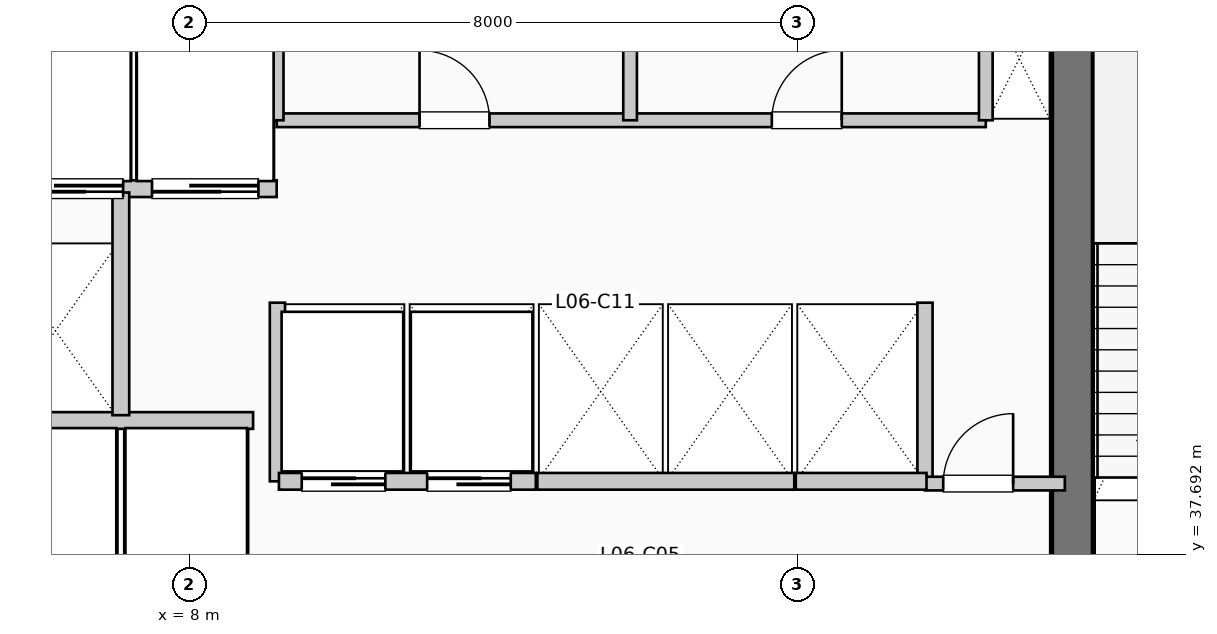
"""IFC4 building model, lengths in metres.
Left out: names, types, materials, properties, quantities, classifications, styles, units other than length and angle.
Written with IfcOpenShell. Run it as: python <this file> out.ifc"""

import sys

from ifc_helpers import new_model, si_unit, direction, frame, frame_2d, origin, place, context, subcontext, project, spatial, rectangle, extrude, element, fill, save


model = new_model("IFC4")
c1 = context("Model", 3, precision=1e-05, world=origin(), true_north=direction((0.0, 1.0)))
c2 = subcontext(c1, "Body", "Model", "MODEL_VIEW")
j1 = project(units=[si_unit("LENGTHUNIT", "METRE"), si_unit("PLANEANGLEUNIT", "RADIAN")], contexts=[c1])
p1 = place(None, origin())
s1 = spatial("IfcSite", under=j1, at=p1, CompositionType="ELEMENT")
p2 = place(p1, origin())
s2 = spatial("IfcBuilding", under=s1, at=p2, CompositionType="ELEMENT")
p3 = place(p2, frame((0.0, 0.0, 30.36)))
s3 = spatial("IfcBuildingStorey", under=s2, at=p3, CompositionType="ELEMENT", Elevation=30.36)
p4 = place(p3, frame((19.62, 37.15, 0.0), z_axis=(0.0, 0.0, 1.0), x_axis=(0.0, 1.0, 0.0)))
e1 = element("IfcWall", 1, at=p4, inside=s3, PredefinedType="SHEAR", context=c2, shape_type="SweptSolid", body=[
    extrude(rectangle(XDim=7.89, YDim=0.55, at=frame_2d((3.945, 0.0))), origin(), (0.0, 0.0, 1.0), 3.96),
])
p5 = place(p3, frame((5.38, 39.45, 0.0), z_axis=(0.0, 0.0, 1.0), x_axis=(1.0, 0.0, 0.0)))
e2 = element("IfcWall", 2, at=p5, inside=s3, PredefinedType="PARTITIONING", context=c2, shape_type="SweptSolid", body=[
    extrude(rectangle(XDim=3.46, YDim=0.22, at=frame_2d((1.73, 0.0))), origin(), (0.0, 0.0, 1.0), 3.71),
])
p6 = place(p3, frame((5.38, 42.5, 0.0), z_axis=(0.0, 0.0, 1.0), x_axis=(1.0, 0.0, 0.0)))
e3 = element("IfcWall", 3, at=p6, inside=s3, PredefinedType="PARTITIONING", context=c2, shape_type="SweptSolid", body=[
    extrude(rectangle(XDim=3.77, YDim=0.22, at=frame_2d((1.885, 0.0))), origin(), (0.0, 0.0, 1.0), 3.71),
])
p7 = place(p6, frame((1.75, 0.0, 0.0), z_axis=(0.0, 0.0, 1.0), x_axis=(-1.0, 0.0, 0.0)))
e4 = element("IfcOpeningElement", 4, at=p7, cuts=e3, PredefinedType="OPENING", context=c2, shape_type="SweptSolid", body=[
    extrude(rectangle(XDim=1.4, YDim=2.2, at=frame_2d((0.7, 1.1))), frame((0.0, 0.12, 0.0), z_axis=(0.0, -1.0, 0.0), x_axis=(1.0, 0.0, 0.0)), (0.0, 0.0, 1.0), 0.24),
])
p8 = place(p6, frame((3.53, 0.0, 0.0), z_axis=(0.0, 0.0, 1.0), x_axis=(-1.0, 0.0, 0.0)))
e5 = element("IfcOpeningElement", 5, at=p8, cuts=e3, PredefinedType="OPENING", context=c2, shape_type="SweptSolid", body=[
    extrude(rectangle(XDim=1.4, YDim=2.2, at=frame_2d((0.7, 1.1))), frame((0.0, 0.12, 0.0), z_axis=(0.0, -1.0, 0.0), x_axis=(1.0, 0.0, 0.0)), (0.0, 0.0, 1.0), 0.24),
])
p9 = place(p3, frame((7.1, 39.52, 0.0), z_axis=(0.0, 0.0, 1.0), x_axis=(0.0, 1.0, 0.0)))
e6 = element("IfcWall", 6, at=p9, inside=s3, PredefinedType="PARTITIONING", context=c2, shape_type="SweptSolid", body=[
    extrude(rectangle(XDim=2.93, YDim=0.22, at=frame_2d((1.465, 0.0))), origin(), (0.0, 0.0, 1.0), 3.71),
])
for number, where, z_axis, x_axis in (
    (7, (9.16, 38.65, 0.0), (0.0, 0.0, 1.0), (0.0, 1.0, 0.0)),
    (8, (17.68, 38.65, 0.0), (0.0, 0.0, 1.0), (0.0, 1.0, 0.0)),
):
    element("IfcWall", number, at=place(p3, frame(where, z_axis=z_axis, x_axis=x_axis)), inside=s3, PredefinedType="PARTITIONING", context=c2, shape_type="SweptSolid", body=[
        extrude(rectangle(XDim=2.35, YDim=0.2, at=frame_2d((1.175, 0.0))), origin(), (0.0, 0.0, 1.0), 3.71),
    ])
p10 = place(p3, frame((17.68, 38.62, 0.0), z_axis=(0.0, 0.0, 1.0), x_axis=(1.0, 0.0, 0.0)))
e9 = element("IfcWall", 9, at=p10, inside=s3, PredefinedType="PARTITIONING", context=c2, shape_type="SweptSolid", body=[
    extrude(rectangle(XDim=1.84, YDim=0.18, at=frame_2d((0.92, 0.0))), origin(), (0.0, 0.0, 1.0), 3.71),
])
p11 = place(p10, frame((0.24, 0.0, 0.0)))
e10 = element("IfcOpeningElement", 10, at=p11, cuts=e9, PredefinedType="OPENING", context=c2, shape_type="SweptSolid", body=[
    extrude(rectangle(XDim=0.92, YDim=2.1, at=frame_2d((0.46, 1.05))), frame((0.0, 0.1, 0.0), z_axis=(0.0, -1.0, 0.0), x_axis=(1.0, 0.0, 0.0)), (0.0, 0.0, 1.0), 0.2),
])
p12 = place(p3, frame((9.18, 38.65, 0.0), z_axis=(0.0, 0.0, 1.0), x_axis=(1.0, 0.0, 0.0)))
e11 = element("IfcWall", 11, at=p12, inside=s3, PredefinedType="PARTITIONING", context=c2, shape_type="SweptSolid", body=[
    extrude(rectangle(XDim=3.38, YDim=0.22, at=frame_2d((1.69, 0.0))), origin(), (0.0, 0.0, 1.0), 3.71),
])
p13 = place(p12, frame((0.3, 0.0, 0.0)))
e12 = element("IfcOpeningElement", 12, at=p13, cuts=e11, PredefinedType="OPENING", context=c2, shape_type="SweptSolid", body=[
    extrude(rectangle(XDim=1.1, YDim=2.2, at=frame_2d((0.55, 1.1))), frame((0.0, 0.12, 0.0), z_axis=(0.0, -1.0, 0.0), x_axis=(1.0, 0.0, 0.0)), (0.0, 0.0, 1.0), 0.24),
])
p14 = place(p12, frame((1.95, 0.0, 0.0)))
e13 = element("IfcOpeningElement", 13, at=p14, cuts=e11, PredefinedType="OPENING", context=c2, shape_type="SweptSolid", body=[
    extrude(rectangle(XDim=1.1, YDim=2.2, at=frame_2d((0.55, 1.1))), frame((0.0, 0.12, 0.0), z_axis=(0.0, -1.0, 0.0), x_axis=(1.0, 0.0, 0.0)), (0.0, 0.0, 1.0), 0.24),
])
p15 = place(p3, frame((12.58, 38.65, 0.0), z_axis=(0.0, 0.0, 1.0), x_axis=(1.0, 0.0, 0.0)))
e14 = element("IfcWall", 14, at=p15, inside=s3, PredefinedType="PARTITIONING", context=c2, shape_type="SweptSolid", body=[
    extrude(rectangle(XDim=3.38, YDim=0.22, at=frame_2d((1.69, 0.0))), origin(), (0.0, 0.0, 1.0), 3.71),
])
p16 = place(p3, frame((15.98, 38.65, 0.0), z_axis=(0.0, 0.0, 1.0), x_axis=(1.0, 0.0, 0.0)))
e15 = element("IfcWall", 15, at=p16, inside=s3, PredefinedType="PARTITIONING", context=c2, shape_type="SweptSolid", body=[
    extrude(rectangle(XDim=1.72, YDim=0.22, at=frame_2d((0.86, 0.0))), origin(), (0.0, 0.0, 1.0), 3.71),
])
p17 = place(p3, frame((9.15, 43.4, 0.0), z_axis=(0.0, 0.0, 1.0), x_axis=(1.0, 0.0, 0.0)))
e16 = element("IfcWall", 16, at=p17, inside=s3, PredefinedType="PLUMBINGWALL", context=c2, shape_type="SweptSolid", body=[
    extrude(rectangle(XDim=9.33, YDim=0.18, at=frame_2d((4.665, 0.0))), origin(), (0.0, 0.0, 1.0), 3.71),
])
p18 = place(p17, frame((1.88, 0.0, 0.0)))
e17 = element("IfcOpeningElement", 17, at=p18, cuts=e16, PredefinedType="OPENING", context=c2, shape_type="SweptSolid", body=[
    extrude(rectangle(XDim=0.92, YDim=2.1, at=frame_2d((0.46, 1.05))), frame((0.0, 0.1, 0.0), z_axis=(0.0, -1.0, 0.0), x_axis=(1.0, 0.0, 0.0)), (0.0, 0.0, 1.0), 0.2),
])
p19 = place(p17, frame((6.515, 0.0, 0.0)))
e18 = element("IfcOpeningElement", 18, at=p19, cuts=e16, PredefinedType="OPENING", context=c2, shape_type="SweptSolid", body=[
    extrude(rectangle(XDim=0.92, YDim=2.1, at=frame_2d((0.46, 1.05))), frame((0.0, 0.1, 0.0), z_axis=(0.0, -1.0, 0.0), x_axis=(1.0, 0.0, 0.0)), (0.0, 0.0, 1.0), 0.2),
])
for number, where, z_axis, x_axis in (
    (19, (9.15, 43.4, 0.0), (0.0, 0.0, 1.0), (0.0, 1.0, 0.0)),
    (20, (18.48, 43.4, 0.0), (0.0, 0.0, 1.0), (0.0, 1.0, 0.0)),
    (21, (13.8, 43.4, 0.0), (0.0, 0.0, 1.0), (0.0, 1.0, 0.0)),
):
    element("IfcWall", number, at=place(p3, frame(where, z_axis=z_axis, x_axis=x_axis)), inside=s3, PredefinedType="PLUMBINGWALL", context=c2, shape_type="SweptSolid", body=[
        extrude(rectangle(XDim=1.88, YDim=0.18, at=frame_2d((0.94, 0.0))), origin(), (0.0, 0.0, 1.0), 3.71),
    ])
p20 = place(p7, origin())
e22 = element("IfcDoor", 22, at=p20, inside=s3, OperationType="SLIDING_TO_LEFT", PredefinedType="DOOR", context=c2, shape_type="SweptSolid", body=[
    extrude(rectangle(XDim=1.4, YDim=2.2, at=frame_2d((0.7, 1.1))), frame((0.0, 0.025, 0.0), z_axis=(0.0, -1.0, 0.0), x_axis=(1.0, 0.0, 0.0)), (0.0, 0.0, 1.0), 0.05),
])
fill(e4, e22)
p21 = place(p8, origin())
e23 = element("IfcDoor", 23, at=p21, inside=s3, OperationType="SLIDING_TO_LEFT", PredefinedType="DOOR", context=c2, shape_type="SweptSolid", body=[
    extrude(rectangle(XDim=1.4, YDim=2.2, at=frame_2d((0.7, 1.1))), frame((0.0, 0.025, 0.0), z_axis=(0.0, -1.0, 0.0), x_axis=(1.0, 0.0, 0.0)), (0.0, 0.0, 1.0), 0.05),
])
fill(e5, e23)
p22 = place(p11, origin())
e24 = element("IfcDoor", 24, at=p22, inside=s3, OperationType="SINGLE_SWING_RIGHT", PredefinedType="DOOR", context=c2, shape_type="SweptSolid", body=[
    extrude(rectangle(XDim=0.92, YDim=2.1, at=frame_2d((0.46, 1.05))), frame((0.0, 0.025, 0.0), z_axis=(0.0, -1.0, 0.0), x_axis=(1.0, 0.0, 0.0)), (0.0, 0.0, 1.0), 0.05),
])
fill(e10, e24)
p23 = place(p13, origin())
e25 = element("IfcDoor", 25, at=p23, inside=s3, OperationType="SLIDING_TO_LEFT", PredefinedType="DOOR", context=c2, shape_type="SweptSolid", body=[
    extrude(rectangle(XDim=1.1, YDim=2.2, at=frame_2d((0.55, 1.1))), frame((0.0, 0.025, 0.0), z_axis=(0.0, -1.0, 0.0), x_axis=(1.0, 0.0, 0.0)), (0.0, 0.0, 1.0), 0.05),
])
fill(e12, e25)
p24 = place(p14, origin())
e26 = element("IfcDoor", 26, at=p24, inside=s3, OperationType="SLIDING_TO_LEFT", PredefinedType="DOOR", context=c2, shape_type="SweptSolid", body=[
    extrude(rectangle(XDim=1.1, YDim=2.2, at=frame_2d((0.55, 1.1))), frame((0.0, 0.025, 0.0), z_axis=(0.0, -1.0, 0.0), x_axis=(1.0, 0.0, 0.0)), (0.0, 0.0, 1.0), 0.05),
])
fill(e13, e26)
p25 = place(p18, origin())
e27 = element("IfcDoor", 27, at=p25, inside=s3, OperationType="SINGLE_SWING_LEFT", PredefinedType="DOOR", context=c2, shape_type="SweptSolid", body=[
    extrude(rectangle(XDim=0.92, YDim=2.1, at=frame_2d((0.46, 1.05))), frame((0.0, 0.025, 0.0), z_axis=(0.0, -1.0, 0.0), x_axis=(1.0, 0.0, 0.0)), (0.0, 0.0, 1.0), 0.05),
])
fill(e17, e27)
p26 = place(p19, origin())
e28 = element("IfcDoor", 28, at=p26, inside=s3, OperationType="SINGLE_SWING_RIGHT", PredefinedType="DOOR", context=c2, shape_type="SweptSolid", body=[
    extrude(rectangle(XDim=0.92, YDim=2.1, at=frame_2d((0.46, 1.05))), frame((0.0, 0.025, 0.0), z_axis=(0.0, -1.0, 0.0), x_axis=(1.0, 0.0, 0.0)), (0.0, 0.0, 1.0), 0.05),
])
fill(e18, e28)
save(model, sys.argv[1])
